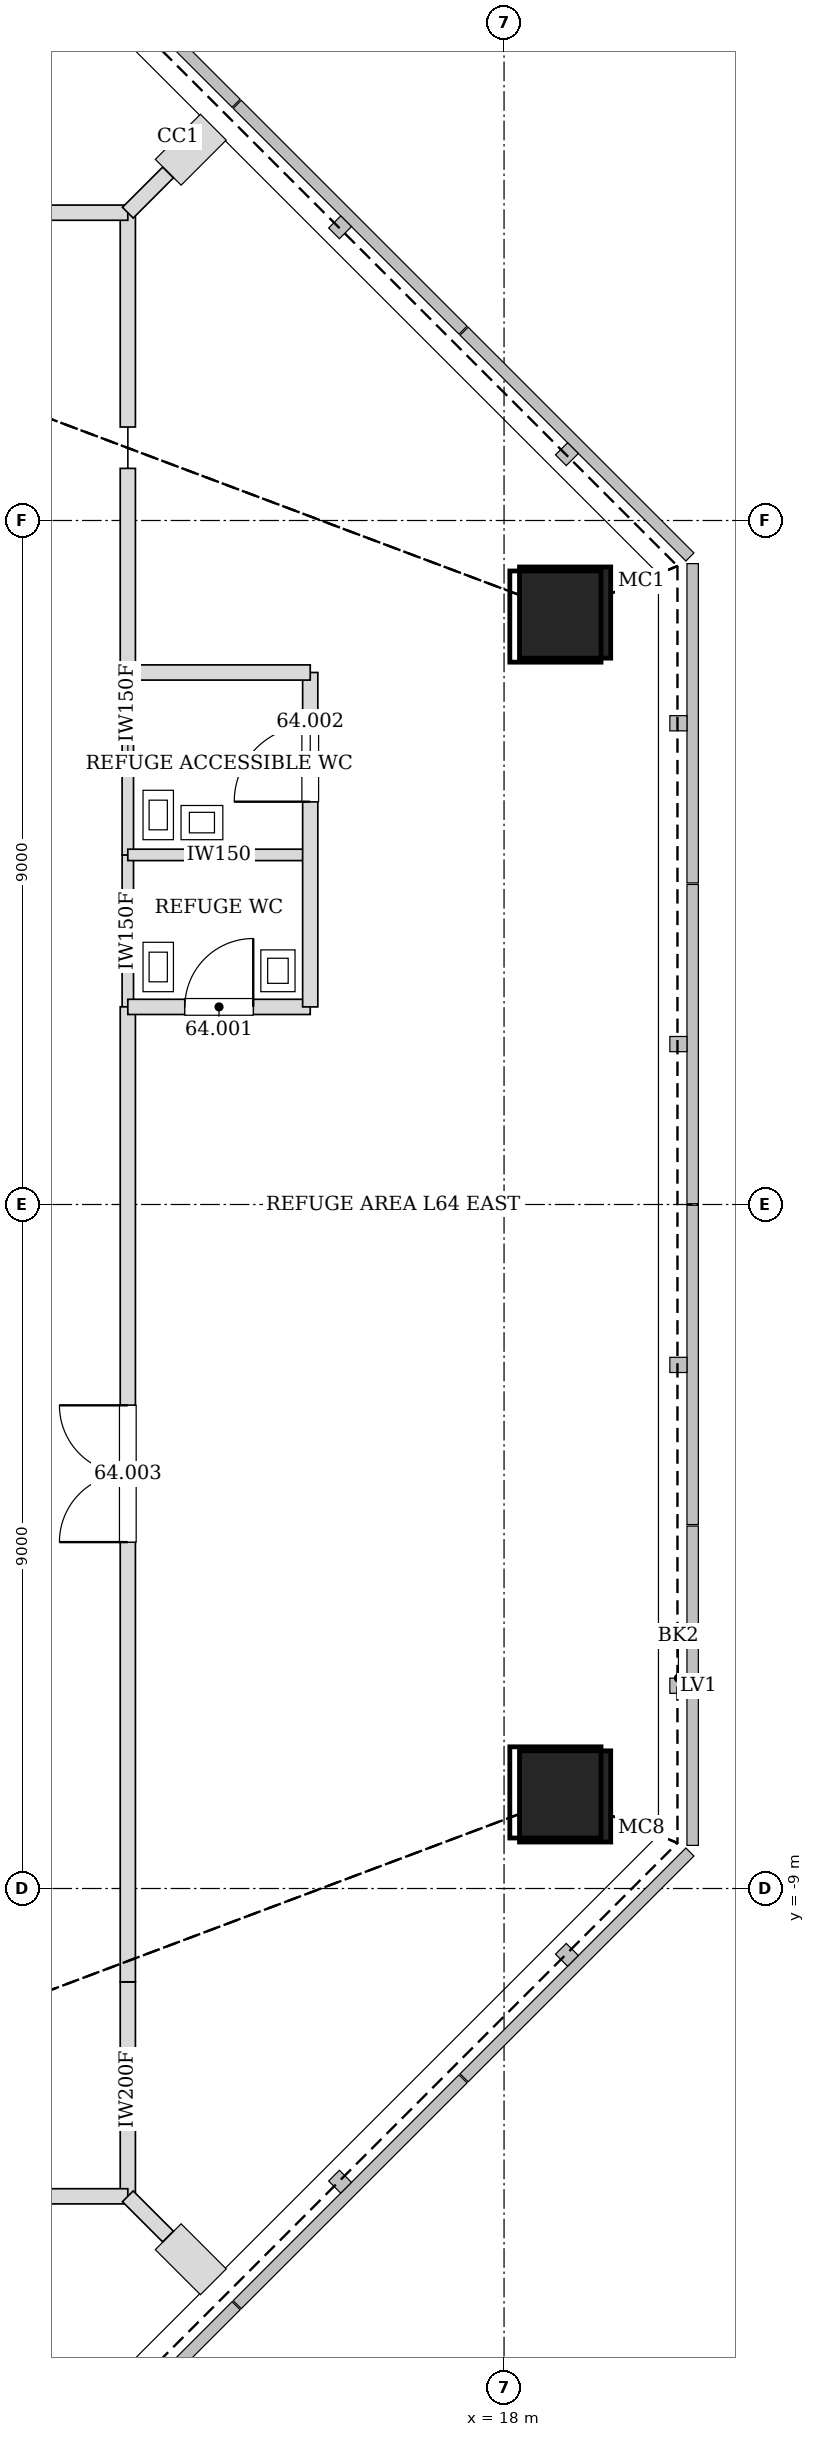
"""IFC4 building model, lengths in metres.
Left out: names, types, materials, properties, quantities, classifications, styles, units other than length and angle.
Written with IfcOpenShell. Run it as: python <this file> out.ifc"""

import sys

from ifc_helpers import new_model, si_unit, direction, frame, frame_2d, origin, origin_2d, place, context, subcontext, project, spatial, rectangle, hollow_rectangle, extrude, element, fill, save


model = new_model("IFC4")
c1 = context("Model", 3, precision=1e-05, world=origin(), true_north=direction((0.0, 1.0)))
c2 = subcontext(c1, "Body", "Model", "MODEL_VIEW")
j1 = project(units=[si_unit("LENGTHUNIT", "METRE"), si_unit("PLANEANGLEUNIT", "RADIAN")], contexts=[c1])
p1 = place(None, origin())
s1 = spatial("IfcSite", under=j1, at=p1, CompositionType="ELEMENT")
p2 = place(p1, origin())
s2 = spatial("IfcBuilding", under=s1, at=p2, CompositionType="ELEMENT")
p3 = place(p2, frame((0.0, 0.0, 266.3)))
s3 = spatial("IfcBuildingStorey", under=s2, at=p3, CompositionType="ELEMENT", Elevation=266.3)
for number, where, z_axis, x_axis in (
    (1, (18.803, 7.789, 0.0), (-0.028, -0.012, 1.0), (0.383, -0.924, 0.0)),
    (2, (18.803, -7.789, 0.0), (-0.028, 0.012, 1.0), (-0.383, -0.924, 0.0)),
):
    element("IfcColumn", number, at=place(p3, frame(where, z_axis=z_axis, x_axis=x_axis)), inside=s3, PredefinedType="COLUMN", context=c2, shape_type="SweptSolid", body=[
        extrude(hollow_rectangle(XDim=1.2, YDim=1.2, WallThickness=0.055, at=origin_2d()), origin(), (0.0, 0.0, 1.0), 4.502),
    ])
p4 = place(p3, frame((13.05, 2.599, 0.0), z_axis=(0.0, 0.0, 1.0), x_axis=(0.0, 1.0, 0.0)))
e3 = element("IfcWall", 3, at=p4, inside=s3, PredefinedType="PARTITIONING", context=c2, shape_type="SweptSolid", body=[
    extrude(rectangle(XDim=2.002, YDim=0.15, at=frame_2d((1.001, 0.0))), origin(), (0.0, 0.0, 1.0), 4.3),
])
p5 = place(p3, frame((13.05, 4.599, 0.0), z_axis=(0.0, 0.0, 1.0), x_axis=(0.0, 1.0, 0.0)))
e4 = element("IfcWall", 4, at=p5, inside=s3, PredefinedType="PARTITIONING", context=c2, shape_type="SweptSolid", body=[
    extrude(rectangle(XDim=2.402, YDim=0.15, at=frame_2d((1.201, 0.0))), origin(), (0.0, 0.0, 1.0), 4.3),
])
p6 = place(p3, frame((13.05, -13.05, 0.0), z_axis=(0.0, 0.0, 1.0), x_axis=(0.0, 1.0, 0.0)))
e5 = element("IfcWall", 5, at=p6, inside=s3, PredefinedType="PARTITIONING", context=c2, shape_type="SweptSolid", body=[
    extrude(rectangle(XDim=2.82, YDim=0.2, at=frame_2d((1.41, 0.0))), origin(), (0.0, 0.0, 1.0), 3.678),
])
p7 = place(p3, frame((13.05, -10.228, 0.0), z_axis=(0.0, 0.0, 1.0), x_axis=(0.0, 1.0, 0.0)))
e6 = element("IfcWall", 6, at=p7, inside=s3, PredefinedType="PARTITIONING", context=c2, shape_type="SweptSolid", body=[
    extrude(rectangle(XDim=12.829, YDim=0.2, at=frame_2d((6.415, 0.0))), origin(), (0.0, 0.0, 1.0), 3.363),
])
p8 = place(p7, frame((5.786, 0.0, 0.0)))
e7 = element("IfcOpeningElement", 7, at=p8, cuts=e6, PredefinedType="OPENING", context=c2, shape_type="SweptSolid", body=[
    extrude(rectangle(XDim=1.8, YDim=2.4, at=frame_2d((0.9, 1.2))), frame((0.0, 0.11, 0.0), z_axis=(0.0, -1.0, 0.0), x_axis=(1.0, 0.0, 0.0)), (0.0, 0.0, 1.0), 0.22),
])
p9 = place(p3, frame((13.05, 6.999, 0.0), z_axis=(0.0, 0.0, 1.0), x_axis=(0.0, 1.0, 0.0)))
e8 = element("IfcWall", 8, at=p9, inside=s3, PredefinedType="PARTITIONING", context=c2, shape_type="SweptSolid", body=[
    extrude(rectangle(XDim=2.687, YDim=0.2, at=frame_2d((1.343, 0.0))), origin(), (0.0, 0.0, 1.0), 3.49),
])
for number, where, z_axis, x_axis in (
    (9, (13.05, 10.23, 0.0), (0.0, 0.0, 1.0), (0.0, 1.0, 0.0)),
    (10, (13.05, 13.05, 0.0), (0.0, 0.0, 1.0), (-1.0, 0.0, 0.0)),
    (11, (10.23, -13.05, 0.0), (0.0, 0.0, 1.0), (1.0, 0.0, 0.0)),
):
    element("IfcWall", number, at=place(p3, frame(where, z_axis=z_axis, x_axis=x_axis)), inside=s3, PredefinedType="PARTITIONING", context=c2, shape_type="SweptSolid", body=[
        extrude(rectangle(XDim=2.82, YDim=0.2, at=frame_2d((1.41, 0.0))), origin(), (0.0, 0.0, 1.0), 3.678),
    ])
p10 = place(p3, frame((15.45, 4.6, 0.0), z_axis=(0.0, 0.0, 1.0), x_axis=(-1.0, 0.0, 0.0)))
e12 = element("IfcWall", 12, at=p10, inside=s3, PredefinedType="PARTITIONING", context=c2, shape_type="SweptSolid", body=[
    extrude(rectangle(XDim=2.4, YDim=0.15, at=frame_2d((1.2, 0.0))), origin(), (0.0, 0.0, 1.0), 4.3),
])
p11 = place(p3, frame((13.05, 2.6, 0.0), z_axis=(0.0, 0.0, 1.0), x_axis=(1.0, 0.0, 0.0)))
e13 = element("IfcWall", 13, at=p11, inside=s3, PredefinedType="PARTITIONING", context=c2, shape_type="SweptSolid", body=[
    extrude(rectangle(XDim=2.4, YDim=0.2, at=frame_2d((1.2, 0.0))), origin(), (0.0, 0.0, 1.0), 4.3),
])
p12 = place(p11, frame((0.75, 0.0, 0.0)))
e14 = element("IfcOpeningElement", 14, at=p12, cuts=e13, PredefinedType="OPENING", context=c2, shape_type="SweptSolid", body=[
    extrude(rectangle(XDim=0.9, YDim=2.1, at=frame_2d((0.45, 1.05))), frame((0.0, 0.11, 0.0), z_axis=(0.0, -1.0, 0.0), x_axis=(1.0, 0.0, 0.0)), (0.0, 0.0, 1.0), 0.22),
])
p13 = place(p3, frame((15.45, 2.6, 0.0), z_axis=(0.0, 0.0, 1.0), x_axis=(0.0, 1.0, 0.0)))
e15 = element("IfcWall", 15, at=p13, inside=s3, PredefinedType="PARTITIONING", context=c2, shape_type="SweptSolid", body=[
    extrude(rectangle(XDim=4.4, YDim=0.2, at=frame_2d((2.2, 0.0))), origin(), (0.0, 0.0, 1.0), 4.3),
])
p14 = place(p13, frame((2.7, 0.0, 0.0)))
e16 = element("IfcOpeningElement", 16, at=p14, cuts=e15, PredefinedType="OPENING", context=c2, shape_type="SweptSolid", body=[
    extrude(rectangle(XDim=1.0, YDim=2.1, at=frame_2d((0.5, 1.05))), frame((0.0, 0.11, 0.0), z_axis=(0.0, -1.0, 0.0), x_axis=(1.0, 0.0, 0.0)), (0.0, 0.0, 1.0), 0.22),
])
p15 = place(p3, frame((15.45, 7.0, 0.0), z_axis=(0.0, 0.0, 1.0), x_axis=(-1.0, 0.0, 0.0)))
e17 = element("IfcWall", 17, at=p15, inside=s3, PredefinedType="PARTITIONING", context=c2, shape_type="SweptSolid", body=[
    extrude(rectangle(XDim=2.4, YDim=0.2, at=frame_2d((1.2, 0.0))), origin(), (0.0, 0.0, 1.0), 4.3),
])
for number, where, z_axis, x_axis in (
    (18, (13.579, 13.579, 0.0), (0.0, 0.0, 1.0), (-0.707, -0.707, 0.0)),
    (19, (13.05, -13.05, 0.0), (0.0, 0.0, 1.0), (0.707, -0.707, 0.0)),
):
    element("IfcWall", number, at=place(p3, frame(where, z_axis=z_axis, x_axis=x_axis)), inside=s3, PredefinedType="PARTITIONING", context=c2, shape_type="SweptSolid", body=[
        extrude(rectangle(XDim=0.748, YDim=0.2, at=frame_2d((0.374, 0.0))), origin(), (0.0, 0.0, 1.0), 3.678),
    ])
p16 = place(p12, origin())
e20 = element("IfcDoor", 20, at=p16, inside=s3, OperationType="SINGLE_SWING_RIGHT", PredefinedType="DOOR", context=c2, shape_type="SweptSolid", body=[
    extrude(rectangle(XDim=0.9, YDim=2.1, at=frame_2d((0.45, 1.05))), frame((0.0, 0.025, 0.0), z_axis=(0.0, -1.0, 0.0), x_axis=(1.0, 0.0, 0.0)), (0.0, 0.0, 1.0), 0.05),
])
fill(e14, e20)
p17 = place(p14, origin())
e21 = element("IfcDoor", 21, at=p17, inside=s3, OperationType="SINGLE_SWING_LEFT", PredefinedType="DOOR", context=c2, shape_type="SweptSolid", body=[
    extrude(rectangle(XDim=1.0, YDim=2.1, at=frame_2d((0.5, 1.05))), frame((0.0, 0.025, 0.0), z_axis=(0.0, -1.0, 0.0), x_axis=(1.0, 0.0, 0.0)), (0.0, 0.0, 1.0), 0.05),
])
fill(e16, e21)
p18 = place(p8, origin())
e22 = element("IfcDoor", 22, at=p18, inside=s3, OperationType="DOUBLE_DOOR_SINGLE_SWING", PredefinedType="DOOR", context=c2, shape_type="SweptSolid", body=[
    extrude(rectangle(XDim=1.8, YDim=2.4, at=frame_2d((0.9, 1.2))), frame((0.0, 0.025, 0.0), z_axis=(0.0, -1.0, 0.0), x_axis=(1.0, 0.0, 0.0)), (0.0, 0.0, 1.0), 0.05),
])
fill(e7, e22)
save(model, sys.argv[1])
